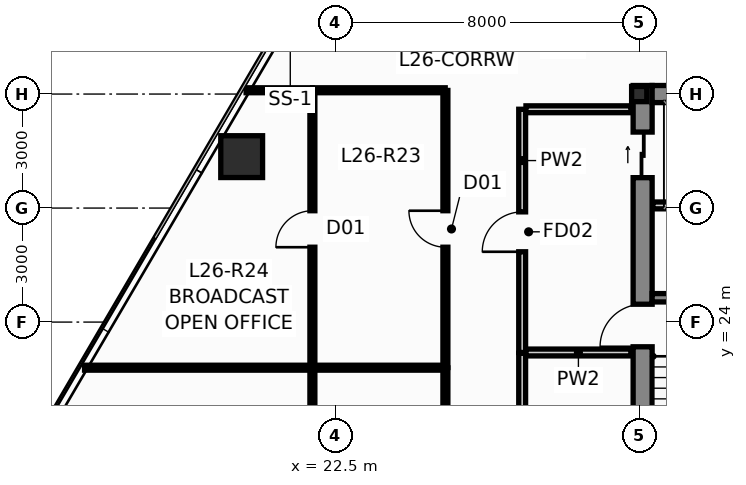
"""IFC4 building model, lengths in metres.
Left out: names, types, materials, properties, quantities, classifications, styles, units other than length and angle.
Written with IfcOpenShell. Run it as: python <this file> out.ifc"""

import sys

from ifc_helpers import new_model, si_unit, direction, frame, frame_2d, origin, origin_2d, place, context, subcontext, project, spatial, rectangle, hollow_rectangle, i_section, extrude, source, transform, mapped, element, fill, save


model = new_model("IFC4")
c1 = context("Model", 3, precision=1e-05, world=origin(), true_north=direction((0.0, 1.0)))
c2 = subcontext(c1, "Body", "Model", "MODEL_VIEW")
j1 = project(units=[si_unit("LENGTHUNIT", "METRE"), si_unit("PLANEANGLEUNIT", "RADIAN")], contexts=[c1])
p1 = place(None, origin())
s1 = spatial("IfcSite", under=j1, at=p1, CompositionType="ELEMENT")
p2 = place(p1, origin())
s2 = spatial("IfcBuilding", under=s1, at=p2, CompositionType="ELEMENT")
p3 = place(p2, frame((0.0, 0.0, 101.75)))
s3 = spatial("IfcBuildingStorey", under=s2, at=p3, CompositionType="ELEMENT", Elevation=101.75)
m1 = source(origin(), c2, "Body", "SweptSolid", [
    extrude(i_section(OverallWidth=0.4, OverallDepth=0.4, WebThickness=0.02, FlangeThickness=0.032, at=origin_2d()), origin(), (0.0, 0.0, 1.0), 3.65),
])
p4 = place(p3, frame((30.5, 30.0, 0.0), z_axis=(0.0, 0.0, 1.0), x_axis=(1.0, 0.0, 0.0)))
e1 = element("IfcColumn", 1, at=p4, inside=s3, PredefinedType="COLUMN", context=c2, shape_type="MappedRepresentation", body=[
    mapped(m1, transform((0.0, 0.0, 0.0), scale=1.0)),
])
p5 = place(p3, frame((30.59, 16.95, 0.0), z_axis=(0.0, 0.0, 1.0), x_axis=(0.0, 1.0, 0.0)))
e2 = element("IfcWall", 2, at=p5, inside=s3, PredefinedType="SHEAR", context=c2, shape_type="SweptSolid", body=[
    extrude(rectangle(XDim=13.275, YDim=0.5, at=frame_2d((6.638, 0.0))), origin(), (0.0, 0.0, 1.0), 3.65),
])
p6 = place(p5, frame((6.4, 0.0, 0.0)))
e3 = element("IfcOpeningElement", 3, at=p6, cuts=e2, PredefinedType="OPENING", context=c2, shape_type="SweptSolid", body=[
    extrude(rectangle(XDim=1.12, YDim=2.15, at=frame_2d((0.56, 1.075))), frame((0.0, 0.262, 0.0), z_axis=(0.0, -1.0, 0.0), x_axis=(1.0, 0.0, 0.0)), (0.0, 0.0, 1.0), 0.524),
])
p7 = place(p5, frame((10.85, 0.0, 0.0)))
e4 = element("IfcOpeningElement", 4, at=p7, cuts=e2, PredefinedType="OPENING", context=c2, shape_type="SweptSolid", body=[
    extrude(rectangle(XDim=1.2, YDim=2.2, at=frame_2d((0.6, 1.1))), frame((0.0, 0.262, 0.0), z_axis=(0.0, -1.0, 0.0), x_axis=(1.0, 0.0, 0.0)), (0.0, 0.0, 1.0), 0.524),
])
p8 = place(p3, frame((30.84, 30.0, 0.0), z_axis=(0.0, 0.0, 1.0), x_axis=(1.0, 0.0, 0.0)))
e5 = element("IfcWall", 5, at=p8, inside=s3, PredefinedType="SHEAR", context=c2, shape_type="SweptSolid", body=[
    extrude(rectangle(XDim=2.9, YDim=0.45, at=frame_2d((1.45, 0.0))), origin(), (0.0, 0.0, 1.0), 3.65),
])
p9 = place(p3, frame((30.84, 24.64, 0.0), z_axis=(0.0, 0.0, 1.0), x_axis=(1.0, 0.0, 0.0)))
e6 = element("IfcWall", 6, at=p9, inside=s3, PredefinedType="SHEAR", context=c2, shape_type="SweptSolid", body=[
    extrude(rectangle(XDim=2.9, YDim=0.22, at=frame_2d((1.45, 0.0))), origin(), (0.0, 0.0, 1.0), 3.65),
])
m2 = source(origin(), c2, "Body", "SweptSolid", [
    extrude(hollow_rectangle(XDim=1.1, YDim=1.1, WallThickness=0.06, at=origin_2d()), origin(), (0.0, 0.0, 1.0), 3.651),
])
p10 = place(p3, frame((20.039, 28.354, 0.0), z_axis=(0.014913299626, -0.013843287097, 0.999792957015), x_axis=(0.680325028146, 0.732910537568, 0.0)))
e7 = element("IfcColumn", 7, at=p10, inside=s3, PredefinedType="COLUMN", context=c2, shape_type="MappedRepresentation", body=[
    mapped(m2, transform((0.0, 0.0, 0.0), scale=1.0)),
])
p11 = place(p3, frame((27.42, 23.2, 0.0), z_axis=(0.0, 0.0, 1.0), x_axis=(0.0, 1.0, 0.0)))
e8 = element("IfcWall", 8, at=p11, inside=s3, PredefinedType="PARTITIONING", context=c2, shape_type="SweptSolid", body=[
    extrude(rectangle(XDim=6.4, YDim=0.18, at=frame_2d((3.2, 0.0))), origin(), (0.0, 0.0, 1.0), 3.026),
])
p12 = place(p11, frame((2.65, 0.0, 0.0)))
e9 = element("IfcOpeningElement", 9, at=p12, cuts=e8, PredefinedType="OPENING", context=c2, shape_type="SweptSolid", body=[
    extrude(rectangle(XDim=1.05, YDim=2.15, at=frame_2d((0.525, 1.075))), frame((0.0, 0.102, 0.0), z_axis=(0.0, -1.0, 0.0), x_axis=(1.0, 0.0, 0.0)), (0.0, 0.0, 1.0), 0.204),
])
p13 = place(p3, frame((27.52, 23.2, 0.0), z_axis=(0.0, 0.0, 1.0), x_axis=(1.0, 0.0, 0.0)))
e10 = element("IfcWall", 10, at=p13, inside=s3, PredefinedType="PARTITIONING", context=c2, shape_type="SweptSolid", body=[
    extrude(rectangle(XDim=2.76, YDim=0.18, at=frame_2d((1.38, 0.0))), origin(), (0.0, 0.0, 1.0), 3.4),
])
p14 = place(p3, frame((27.52, 29.6, 0.0), z_axis=(0.0, 0.0, 1.0), x_axis=(1.0, 0.0, 0.0)))
e11 = element("IfcWall", 11, at=p14, inside=s3, PredefinedType="PARTITIONING", context=c2, shape_type="SweptSolid", body=[
    extrude(rectangle(XDim=2.76, YDim=0.18, at=frame_2d((1.38, 0.0))), origin(), (0.0, 0.0, 1.0), 2.783),
])
p15 = place(p3, frame((30.86, 27.07, 0.0), z_axis=(0.0, 0.0, 1.0), x_axis=(1.0, 0.0, 0.0)))
e12 = element("IfcWall", 12, at=p15, inside=s3, PredefinedType="PARTITIONING", context=c2, shape_type="SweptSolid", body=[
    extrude(rectangle(XDim=2.9, YDim=0.18, at=frame_2d((1.45, 0.0))), origin(), (0.0, 0.0, 1.0), 3.4),
])
p16 = place(p3, frame((27.42, 17.15, 0.0), z_axis=(0.0, 0.0, 1.0), x_axis=(0.0, 1.0, 0.0)))
e13 = element("IfcWall", 13, at=p16, inside=s3, PredefinedType="PARTITIONING", context=c2, shape_type="SweptSolid", body=[
    extrude(rectangle(XDim=6.03, YDim=0.18, at=frame_2d((3.015, 0.0))), origin(), (0.0, 0.0, 1.0), 3.026),
])
p17 = place(p16, frame((2.45, 0.0, 0.0)))
e14 = element("IfcOpeningElement", 14, at=p17, cuts=e13, PredefinedType="OPENING", context=c2, shape_type="SweptSolid", body=[
    extrude(rectangle(XDim=1.05, YDim=2.15, at=frame_2d((0.525, 1.075))), frame((0.0, 0.102, 0.0), z_axis=(0.0, -1.0, 0.0), x_axis=(1.0, 0.0, 0.0)), (0.0, 0.0, 1.0), 0.204),
])
p18 = place(p3, frame((25.4, 22.805, 0.0), z_axis=(0.0, 0.0, 1.0), x_axis=(0.0, 1.0, 0.0)))
e15 = element("IfcWall", 15, at=p18, inside=s3, PredefinedType="PARTITIONING", context=c2, shape_type="SweptSolid", body=[
    extrude(rectangle(XDim=7.29, YDim=0.13, at=frame_2d((3.645, 0.0))), origin(), (0.0, 0.0, 1.0), 3.026),
])
p19 = place(p18, frame((3.165, 0.0, 0.0)))
e16 = element("IfcOpeningElement", 16, at=p19, cuts=e15, PredefinedType="OPENING", context=c2, shape_type="SweptSolid", body=[
    extrude(rectangle(XDim=0.96, YDim=2.15, at=frame_2d((0.48, 1.075))), frame((0.0, 0.077, 0.0), z_axis=(0.0, -1.0, 0.0), x_axis=(1.0, 0.0, 0.0)), (0.0, 0.0, 1.0), 0.154),
])
p20 = place(p3, frame((21.9, 22.805, 0.0), z_axis=(0.0, 0.0, 1.0), x_axis=(0.0, 1.0, 0.0)))
e17 = element("IfcWall", 17, at=p20, inside=s3, PredefinedType="PARTITIONING", context=c2, shape_type="SweptSolid", body=[
    extrude(rectangle(XDim=7.29, YDim=0.13, at=frame_2d((3.645, 0.0))), origin(), (0.0, 0.0, 1.0), 3.026),
])
p21 = place(p20, frame((3.165, 0.0, 0.0)))
e18 = element("IfcOpeningElement", 18, at=p21, cuts=e17, PredefinedType="OPENING", context=c2, shape_type="SweptSolid", body=[
    extrude(rectangle(XDim=0.96, YDim=2.15, at=frame_2d((0.48, 1.075))), frame((0.0, 0.077, 0.0), z_axis=(0.0, -1.0, 0.0), x_axis=(1.0, 0.0, 0.0)), (0.0, 0.0, 1.0), 0.154),
])
p22 = place(p3, frame((15.905, 22.8, 0.0), z_axis=(0.0, 0.0, 1.0), x_axis=(1.0, 0.0, 0.0)))
e19 = element("IfcWall", 19, at=p22, inside=s3, PredefinedType="PARTITIONING", context=c2, shape_type="SweptSolid", body=[
    extrude(rectangle(XDim=5.99, YDim=0.13, at=frame_2d((2.995, 0.0))), origin(), (0.0, 0.0, 1.0), 3.4),
])
p23 = place(p3, frame((25.4, 17.105, 0.0), z_axis=(0.0, 0.0, 1.0), x_axis=(0.0, 1.0, 0.0)))
e20 = element("IfcWall", 20, at=p23, inside=s3, PredefinedType="PARTITIONING", context=c2, shape_type="SweptSolid", body=[
    extrude(rectangle(XDim=5.69, YDim=0.13, at=frame_2d((2.845, 0.0))), origin(), (0.0, 0.0, 1.0), 3.026),
])
p24 = place(p23, frame((2.365, 0.0, 0.0)))
e21 = element("IfcOpeningElement", 21, at=p24, cuts=e20, PredefinedType="OPENING", context=c2, shape_type="SweptSolid", body=[
    extrude(rectangle(XDim=0.96, YDim=2.15, at=frame_2d((0.48, 1.075))), frame((0.0, 0.077, 0.0), z_axis=(0.0, -1.0, 0.0), x_axis=(1.0, 0.0, 0.0)), (0.0, 0.0, 1.0), 0.154),
])
p25 = place(p3, frame((21.9, 17.105, 0.0), z_axis=(0.0, 0.0, 1.0), x_axis=(0.0, 1.0, 0.0)))
e22 = element("IfcWall", 22, at=p25, inside=s3, PredefinedType="PARTITIONING", context=c2, shape_type="SweptSolid", body=[
    extrude(rectangle(XDim=5.69, YDim=0.13, at=frame_2d((2.845, 0.0))), origin(), (0.0, 0.0, 1.0), 3.026),
])
for number, where, z_axis, x_axis in (
    (23, (25.395, 30.1, 0.0), (0.0, 0.0, 1.0), (-1.0, 0.0, 0.0)),
    (24, (21.905, 22.8, 0.0), (0.0, 0.0, 1.0), (1.0, 0.0, 0.0)),
):
    element("IfcWall", number, at=place(p3, frame(where, z_axis=z_axis, x_axis=x_axis)), inside=s3, PredefinedType="PARTITIONING", context=c2, shape_type="SweptSolid", body=[
        extrude(rectangle(XDim=3.49, YDim=0.13, at=frame_2d((1.745, 0.0))), origin(), (0.0, 0.0, 1.0), 3.4),
    ])
p26 = place(p3, frame((20.156, 30.1, 0.0), z_axis=(0.0, 0.0, 1.0), x_axis=(1.0, 0.0, 0.0)))
e25 = element("IfcWall", 25, at=p26, inside=s3, PredefinedType="PARTITIONING", context=c2, shape_type="SweptSolid", body=[
    extrude(rectangle(XDim=1.739, YDim=0.13, at=frame_2d((0.87, 0.0))), origin(), (0.0, 0.0, 1.0), 3.4),
])
p27 = place(p6, origin())
e26 = element("IfcDoor", 26, at=p27, inside=s3, OperationType="SINGLE_SWING_LEFT", PredefinedType="DOOR", context=c2, shape_type="SweptSolid", body=[
    extrude(rectangle(XDim=1.12, YDim=2.15, at=frame_2d((0.56, 1.075))), frame((0.0, 0.025, 0.0), z_axis=(0.0, -1.0, 0.0), x_axis=(1.0, 0.0, 0.0)), (0.0, 0.0, 1.0), 0.05),
])
fill(e3, e26)
p28 = place(p7, origin())
e27 = element("IfcDoor", 27, at=p28, inside=s3, OperationType="SLIDING_TO_LEFT", PredefinedType="DOOR", context=c2, shape_type="SweptSolid", body=[
    extrude(rectangle(XDim=1.2, YDim=2.2, at=frame_2d((0.6, 1.1))), frame((0.0, 0.025, 0.0), z_axis=(0.0, -1.0, 0.0), x_axis=(1.0, 0.0, 0.0)), (0.0, 0.0, 1.0), 0.05),
])
fill(e4, e27)
p29 = place(p12, origin())
e28 = element("IfcDoor", 28, at=p29, inside=s3, OperationType="SINGLE_SWING_LEFT", PredefinedType="DOOR", context=c2, shape_type="SweptSolid", body=[
    extrude(rectangle(XDim=1.05, YDim=2.15, at=frame_2d((0.525, 1.075))), frame((0.0, 0.025, 0.0), z_axis=(0.0, -1.0, 0.0), x_axis=(1.0, 0.0, 0.0)), (0.0, 0.0, 1.0), 0.05),
])
fill(e9, e28)
p30 = place(p19, origin())
e29 = element("IfcDoor", 29, at=p30, inside=s3, OperationType="SINGLE_SWING_RIGHT", PredefinedType="DOOR", context=c2, shape_type="SweptSolid", body=[
    extrude(rectangle(XDim=0.96, YDim=2.15, at=frame_2d((0.48, 1.075))), frame((0.0, 0.025, 0.0), z_axis=(0.0, -1.0, 0.0), x_axis=(1.0, 0.0, 0.0)), (0.0, 0.0, 1.0), 0.05),
])
fill(e16, e29)
p31 = place(p21, origin())
e30 = element("IfcDoor", 30, at=p31, inside=s3, OperationType="SINGLE_SWING_LEFT", PredefinedType="DOOR", context=c2, shape_type="SweptSolid", body=[
    extrude(rectangle(XDim=0.96, YDim=2.15, at=frame_2d((0.48, 1.075))), frame((0.0, 0.025, 0.0), z_axis=(0.0, -1.0, 0.0), x_axis=(1.0, 0.0, 0.0)), (0.0, 0.0, 1.0), 0.05),
])
fill(e18, e30)
save(model, sys.argv[1])
